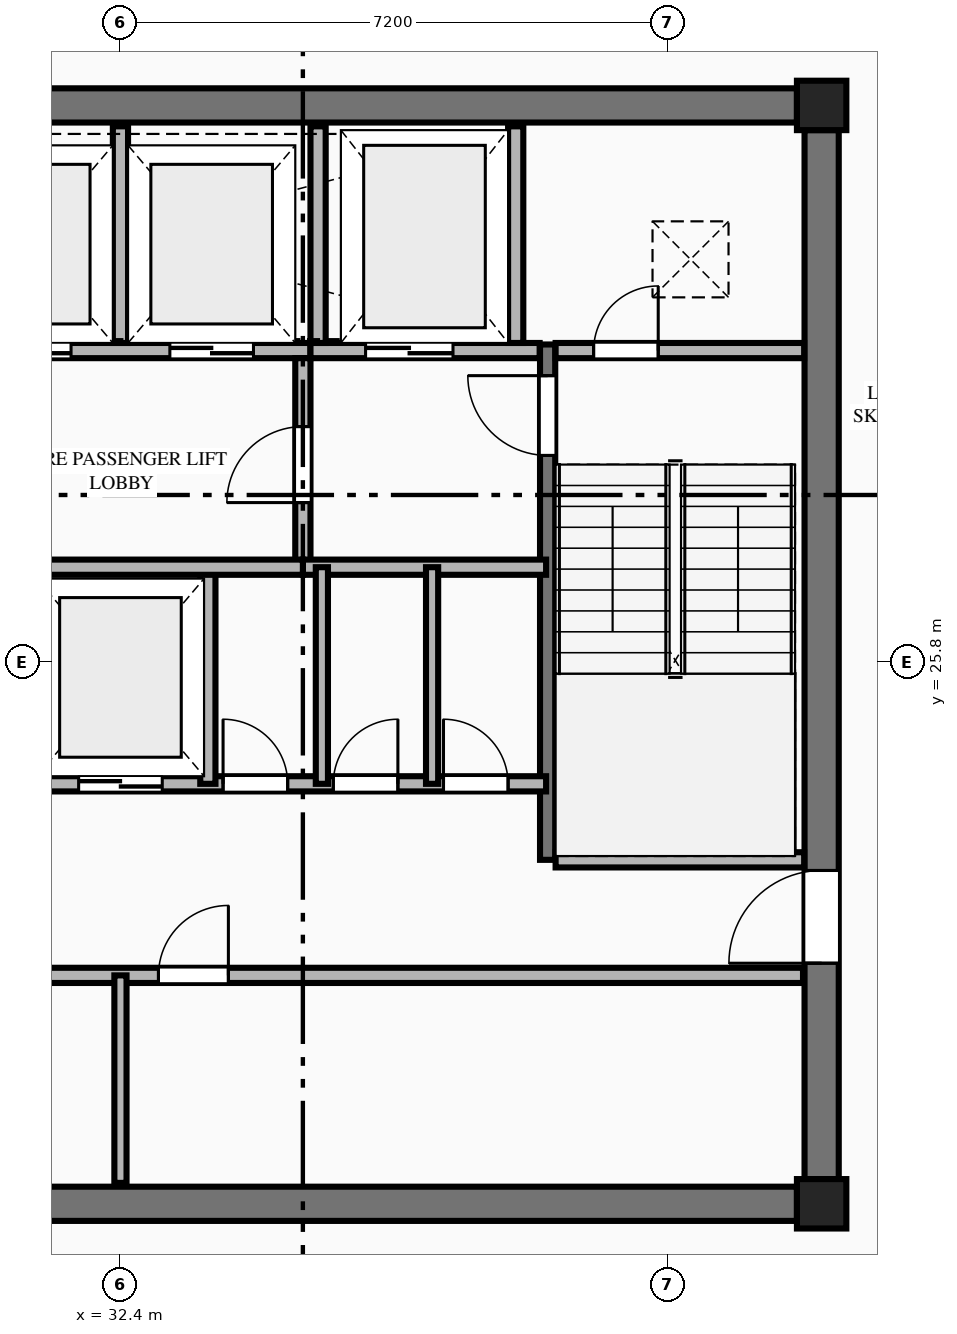
"""IFC4 building model, lengths in metres.
Left out: names, types, materials, properties, quantities, classifications, styles, units other than length and angle.
Written with IfcOpenShell. Run it as: python <this file> out.ifc"""

import sys

from ifc_helpers import new_model, si_unit, direction, frame, frame_2d, origin, origin_2d, place, context, subcontext, project, spatial, rectangle, extrude, element, fill, save


model = new_model("IFC4")
c1 = context("Model", 3, precision=1e-05, world=origin(), true_north=direction((0.0, 1.0)))
c2 = subcontext(c1, "Body", "Model", "MODEL_VIEW")
j1 = project(units=[si_unit("LENGTHUNIT", "METRE"), si_unit("PLANEANGLEUNIT", "RADIAN")], contexts=[c1])
p1 = place(None, origin())
s1 = spatial("IfcSite", under=j1, at=p1, CompositionType="ELEMENT")
p2 = place(p1, origin())
s2 = spatial("IfcBuilding", under=s1, at=p2, CompositionType="ELEMENT")
p3 = place(p2, frame((0.0, 0.0, 230.65)))
s3 = spatial("IfcBuildingStorey", under=s2, at=p3, CompositionType="ELEMENT", Elevation=230.65)
for number, where, z_axis, x_axis in (
    (1, (41.625, 18.675, 0.0), (0.0, 0.0, 1.0), (1.0, 0.0, 0.0)),
    (2, (41.625, 33.125, 0.0), (0.0, 0.0, 1.0), (1.0, 0.0, 0.0)),
):
    element("IfcColumn", number, at=place(p3, frame(where, z_axis=z_axis, x_axis=x_axis)), inside=s3, PredefinedType="COLUMN", context=c2, shape_type="SweptSolid", body=[
        extrude(rectangle(XDim=0.65, YDim=0.65, at=origin_2d()), origin(), (0.0, 0.0, 1.0), 3.65),
    ])
for number, where, z_axis, x_axis in (
    (3, (23.5, 18.675, 0.0), (0.0, 0.0, 1.0), (1.0, 0.0, 0.0)),
    (4, (23.5, 33.125, 0.0), (0.0, 0.0, 1.0), (1.0, 0.0, 0.0)),
):
    element("IfcWall", number, at=place(p3, frame(where, z_axis=z_axis, x_axis=x_axis)), inside=s3, PredefinedType="SHEAR", context=c2, shape_type="SweptSolid", body=[
        extrude(rectangle(XDim=17.8, YDim=0.45, at=frame_2d((8.9, 0.0))), origin(), (0.0, 0.0, 1.0), 3.45),
    ])
p4 = place(p3, frame((41.625, 19.0, 0.0), z_axis=(0.0, 0.0, 1.0), x_axis=(0.0, 1.0, 0.0)))
e5 = element("IfcWall", 5, at=p4, inside=s3, PredefinedType="SHEAR", context=c2, shape_type="SweptSolid", body=[
    extrude(rectangle(XDim=13.8, YDim=0.45, at=frame_2d((6.9, 0.0))), origin(), (0.0, 0.0, 1.0), 3.45),
])
p5 = place(p4, frame((2.84, 0.0, 0.0)))
e6 = element("IfcOpeningElement", 6, at=p5, cuts=e5, PredefinedType="OPENING", context=c2, shape_type="SweptSolid", body=[
    extrude(rectangle(XDim=1.22, YDim=2.25, at=frame_2d((0.61, 1.125))), frame((0.0, 0.235, 0.0), z_axis=(0.0, -1.0, 0.0), x_axis=(1.0, 0.0, 0.0)), (0.0, 0.0, 1.0), 0.47),
])
p6 = place(p3, frame((38.02, 23.2, 0.0), z_axis=(0.0, 0.0, 1.0), x_axis=(0.0, 1.0, 0.0)))
e7 = element("IfcWall", 7, at=p6, inside=s3, PredefinedType="SHEAR", context=c2, shape_type="SweptSolid", body=[
    extrude(rectangle(XDim=6.78, YDim=0.2, at=frame_2d((3.39, 0.0))), origin(), (0.0, 0.0, 1.0), 3.65),
])
p7 = place(p6, frame((5.32, 0.0, 0.0)))
e8 = element("IfcOpeningElement", 8, at=p7, cuts=e7, PredefinedType="OPENING", context=c2, shape_type="SweptSolid", body=[
    extrude(rectangle(XDim=1.05, YDim=2.15, at=frame_2d((0.525, 1.075))), frame((0.0, 0.11, 0.0), z_axis=(0.0, -1.0, 0.0), x_axis=(1.0, 0.0, 0.0)), (0.0, 0.0, 1.0), 0.22),
])
p8 = place(p3, frame((38.125, 23.2, 0.0), z_axis=(0.0, 0.0, 1.0), x_axis=(1.0, 0.0, 0.0)))
e9 = element("IfcWall", 9, at=p8, inside=s3, PredefinedType="PLUMBINGWALL", context=c2, shape_type="SweptSolid", body=[
    extrude(rectangle(XDim=3.27, YDim=0.2, at=frame_2d((1.635, 0.0))), origin(), (0.0, 0.0, 1.0), 3.45),
])
p9 = place(p3, frame((29.9, 29.9, 0.0), z_axis=(0.0, 0.0, 1.0), x_axis=(1.0, 0.0, 0.0)))
e10 = element("IfcWall", 10, at=p9, inside=s3, PredefinedType="PLUMBINGWALL", context=c2, shape_type="SweptSolid", body=[
    extrude(rectangle(XDim=5.0, YDim=0.2, at=frame_2d((2.5, 0.0))), origin(), (0.0, 0.0, 1.0), 3.45),
])
p10 = place(p9, frame((0.75, 0.0, 0.0)))
e11 = element("IfcOpeningElement", 11, at=p10, cuts=e10, PredefinedType="OPENING", context=c2, shape_type="SweptSolid", body=[
    extrude(rectangle(XDim=1.1, YDim=2.2, at=frame_2d((0.55, 1.1))), frame((0.0, 0.11, 0.0), z_axis=(0.0, -1.0, 0.0), x_axis=(1.0, 0.0, 0.0)), (0.0, 0.0, 1.0), 0.22),
])
p11 = place(p9, frame((3.15, 0.0, 0.0)))
e12 = element("IfcOpeningElement", 12, at=p11, cuts=e10, PredefinedType="OPENING", context=c2, shape_type="SweptSolid", body=[
    extrude(rectangle(XDim=1.1, YDim=2.2, at=frame_2d((0.55, 1.1))), frame((0.0, 0.11, 0.0), z_axis=(0.0, -1.0, 0.0), x_axis=(1.0, 0.0, 0.0)), (0.0, 0.0, 1.0), 0.22),
])
p12 = place(p3, frame((34.9, 29.9, 0.0), z_axis=(0.0, 0.0, 1.0), x_axis=(1.0, 0.0, 0.0)))
e13 = element("IfcWall", 13, at=p12, inside=s3, PredefinedType="PLUMBINGWALL", context=c2, shape_type="SweptSolid", body=[
    extrude(rectangle(XDim=3.015, YDim=0.2, at=frame_2d((1.508, 0.0))), origin(), (0.0, 0.0, 1.0), 3.45),
])
p13 = place(p12, frame((0.725, 0.0, 0.0)))
e14 = element("IfcOpeningElement", 14, at=p13, cuts=e13, PredefinedType="OPENING", context=c2, shape_type="SweptSolid", body=[
    extrude(rectangle(XDim=1.15, YDim=2.2, at=frame_2d((0.575, 1.1))), frame((0.0, 0.11, 0.0), z_axis=(0.0, -1.0, 0.0), x_axis=(1.0, 0.0, 0.0)), (0.0, 0.0, 1.0), 0.22),
])
p14 = place(p3, frame((38.125, 29.9, 0.0), z_axis=(0.0, 0.0, 1.0), x_axis=(1.0, 0.0, 0.0)))
e15 = element("IfcWall", 15, at=p14, inside=s3, PredefinedType="PLUMBINGWALL", context=c2, shape_type="SweptSolid", body=[
    extrude(rectangle(XDim=3.27, YDim=0.2, at=frame_2d((1.635, 0.0))), origin(), (0.0, 0.0, 1.0), 3.45),
])
p15 = place(p14, frame((0.5, 0.0, 0.0)))
e16 = element("IfcOpeningElement", 16, at=p15, cuts=e15, PredefinedType="OPENING", context=c2, shape_type="SweptSolid", body=[
    extrude(rectangle(XDim=0.85, YDim=2.05, at=frame_2d((0.425, 1.025))), frame((0.0, 0.11, 0.0), z_axis=(0.0, -1.0, 0.0), x_axis=(1.0, 0.0, 0.0)), (0.0, 0.0, 1.0), 0.22),
])
for number, where, z_axis, x_axis in (
    (17, (32.4, 30.0, 0.0), (0.0, 0.0, 1.0), (0.0, 1.0, 0.0)),
    (18, (35.0, 30.0, 0.0), (0.0, 0.0, 1.0), (0.0, 1.0, 0.0)),
    (19, (37.6, 30.0, 0.0), (0.0, 0.0, 1.0), (0.0, 1.0, 0.0)),
):
    element("IfcWall", number, at=place(p3, frame(where, z_axis=z_axis, x_axis=x_axis)), inside=s3, PredefinedType="PLUMBINGWALL", context=c2, shape_type="SweptSolid", body=[
        extrude(rectangle(XDim=2.85, YDim=0.2, at=frame_2d((1.425, 0.0))), origin(), (0.0, 0.0, 1.0), 3.45),
    ])
p16 = place(p3, frame((34.8, 27.05, 0.0), z_axis=(0.0, 0.0, 1.0), x_axis=(0.0, 1.0, 0.0)))
e20 = element("IfcWall", 20, at=p16, inside=s3, PredefinedType="PLUMBINGWALL", context=c2, shape_type="SweptSolid", body=[
    extrude(rectangle(XDim=2.75, YDim=0.2, at=frame_2d((1.375, 0.0))), origin(), (0.0, 0.0, 1.0), 3.45),
])
p17 = place(p16, frame((0.85, 0.0, 0.0)))
e21 = element("IfcOpeningElement", 21, at=p17, cuts=e20, PredefinedType="OPENING", context=c2, shape_type="SweptSolid", body=[
    extrude(rectangle(XDim=1.0, YDim=2.15, at=frame_2d((0.5, 1.075))), frame((0.0, 0.11, 0.0), z_axis=(0.0, -1.0, 0.0), x_axis=(1.0, 0.0, 0.0)), (0.0, 0.0, 1.0), 0.22),
])
p18 = place(p3, frame((34.8, 27.05, 0.0), z_axis=(0.0, 0.0, 1.0), x_axis=(1.0, 0.0, 0.0)))
e22 = element("IfcWall", 22, at=p18, inside=s3, PredefinedType="PLUMBINGWALL", context=c2, shape_type="SweptSolid", body=[
    extrude(rectangle(XDim=3.2, YDim=0.2, at=frame_2d((1.6, 0.0))), origin(), (0.0, 0.0, 1.0), 3.45),
])
p19 = place(p3, frame((31.2, 24.2, 0.0), z_axis=(0.0, 0.0, 1.0), x_axis=(1.0, 0.0, 0.0)))
e23 = element("IfcWall", 23, at=p19, inside=s3, PredefinedType="PLUMBINGWALL", context=c2, shape_type="SweptSolid", body=[
    extrude(rectangle(XDim=6.8, YDim=0.2, at=frame_2d((3.4, 0.0))), origin(), (0.0, 0.0, 1.0), 3.45),
])
p20 = place(p19, frame((0.65, 0.0, 0.0)))
e24 = element("IfcOpeningElement", 24, at=p20, cuts=e23, PredefinedType="OPENING", context=c2, shape_type="SweptSolid", body=[
    extrude(rectangle(XDim=1.1, YDim=2.2, at=frame_2d((0.55, 1.1))), frame((0.0, 0.11, 0.0), z_axis=(0.0, -1.0, 0.0), x_axis=(1.0, 0.0, 0.0)), (0.0, 0.0, 1.0), 0.22),
])
p21 = place(p19, frame((2.55, 0.0, 0.0)))
e25 = element("IfcOpeningElement", 25, at=p21, cuts=e23, PredefinedType="OPENING", context=c2, shape_type="SweptSolid", body=[
    extrude(rectangle(XDim=0.85, YDim=2.05, at=frame_2d((0.425, 1.025))), frame((0.0, 0.11, 0.0), z_axis=(0.0, -1.0, 0.0), x_axis=(1.0, 0.0, 0.0)), (0.0, 0.0, 1.0), 0.22),
])
p22 = place(p19, frame((4.0, 0.0, 0.0)))
e26 = element("IfcOpeningElement", 26, at=p22, cuts=e23, PredefinedType="OPENING", context=c2, shape_type="SweptSolid", body=[
    extrude(rectangle(XDim=0.85, YDim=2.05, at=frame_2d((0.425, 1.025))), frame((0.0, 0.11, 0.0), z_axis=(0.0, -1.0, 0.0), x_axis=(1.0, 0.0, 0.0)), (0.0, 0.0, 1.0), 0.22),
])
p23 = place(p19, frame((5.45, 0.0, 0.0)))
e27 = element("IfcOpeningElement", 27, at=p23, cuts=e23, PredefinedType="OPENING", context=c2, shape_type="SweptSolid", body=[
    extrude(rectangle(XDim=0.85, YDim=2.05, at=frame_2d((0.425, 1.025))), frame((0.0, 0.11, 0.0), z_axis=(0.0, -1.0, 0.0), x_axis=(1.0, 0.0, 0.0)), (0.0, 0.0, 1.0), 0.22),
])
p24 = place(p3, frame((33.55, 24.2, 0.0), z_axis=(0.0, 0.0, 1.0), x_axis=(0.0, 1.0, 0.0)))
e28 = element("IfcWall", 28, at=p24, inside=s3, PredefinedType="PLUMBINGWALL", context=c2, shape_type="SweptSolid", body=[
    extrude(rectangle(XDim=2.85, YDim=0.2, at=frame_2d((1.425, 0.0))), origin(), (0.0, 0.0, 1.0), 3.45),
])
p25 = place(p3, frame((31.25, 27.05, 0.0), z_axis=(0.0, 0.0, 1.0), x_axis=(1.0, 0.0, 0.0)))
e29 = element("IfcWall", 29, at=p25, inside=s3, PredefinedType="PLUMBINGWALL", context=c2, shape_type="SweptSolid", body=[
    extrude(rectangle(XDim=3.55, YDim=0.2, at=frame_2d((1.775, 0.0))), origin(), (0.0, 0.0, 1.0), 3.45),
])
for number, where, z_axis, x_axis in (
    (30, (35.05, 24.2, 0.0), (0.0, 0.0, 1.0), (0.0, 1.0, 0.0)),
    (31, (36.5, 24.2, 0.0), (0.0, 0.0, 1.0), (0.0, 1.0, 0.0)),
):
    element("IfcWall", number, at=place(p3, frame(where, z_axis=z_axis, x_axis=x_axis)), inside=s3, PredefinedType="PARTITIONING", context=c2, shape_type="SweptSolid", body=[
        extrude(rectangle(XDim=2.85, YDim=0.16, at=frame_2d((1.425, 0.0))), origin(), (0.0, 0.0, 1.0), 3.45),
    ])
p26 = place(p3, frame((23.42, 21.68, 0.0), z_axis=(0.0, 0.0, 1.0), x_axis=(1.0, 0.0, 0.0)))
e32 = element("IfcWall", 32, at=p26, inside=s3, PredefinedType="PLUMBINGWALL", context=c2, shape_type="SweptSolid", body=[
    extrude(rectangle(XDim=17.96, YDim=0.2, at=frame_2d((8.98, 0.0))), origin(), (0.0, 0.0, 1.0), 3.45),
])
p27 = place(p26, frame((0.46, 0.0, 0.0)))
e33 = element("IfcOpeningElement", 33, at=p27, cuts=e32, PredefinedType="OPENING", context=c2, shape_type="SweptSolid", body=[
    extrude(rectangle(XDim=0.92, YDim=2.15, at=frame_2d((0.46, 1.075))), frame((0.0, 0.11, 0.0), z_axis=(0.0, -1.0, 0.0), x_axis=(1.0, 0.0, 0.0)), (0.0, 0.0, 1.0), 0.22),
])
p28 = place(p26, frame((9.48, 0.0, 0.0)))
e34 = element("IfcOpeningElement", 34, at=p28, cuts=e32, PredefinedType="OPENING", context=c2, shape_type="SweptSolid", body=[
    extrude(rectangle(XDim=0.92, YDim=2.15, at=frame_2d((0.46, 1.075))), frame((0.0, 0.11, 0.0), z_axis=(0.0, -1.0, 0.0), x_axis=(1.0, 0.0, 0.0)), (0.0, 0.0, 1.0), 0.22),
])
p29 = place(p3, frame((32.4, 18.95, 0.0), z_axis=(0.0, 0.0, 1.0), x_axis=(0.0, 1.0, 0.0)))
e35 = element("IfcWall", 35, at=p29, inside=s3, PredefinedType="PARTITIONING", context=c2, shape_type="SweptSolid", body=[
    extrude(rectangle(XDim=2.73, YDim=0.16, at=frame_2d((1.365, 0.0))), origin(), (0.0, 0.0, 1.0), 3.45),
])
p30 = place(p5, origin())
e36 = element("IfcDoor", 36, at=p30, inside=s3, OperationType="SINGLE_SWING_LEFT", PredefinedType="DOOR", context=c2, shape_type="SweptSolid", body=[
    extrude(rectangle(XDim=1.22, YDim=2.25, at=frame_2d((0.61, 1.125))), frame((0.0, 0.025, 0.0), z_axis=(0.0, -1.0, 0.0), x_axis=(1.0, 0.0, 0.0)), (0.0, 0.0, 1.0), 0.05),
])
fill(e6, e36)
p31 = place(p7, origin())
e37 = element("IfcDoor", 37, at=p31, inside=s3, OperationType="SINGLE_SWING_RIGHT", PredefinedType="DOOR", context=c2, shape_type="SweptSolid", body=[
    extrude(rectangle(XDim=1.05, YDim=2.15, at=frame_2d((0.525, 1.075))), frame((0.0, 0.025, 0.0), z_axis=(0.0, -1.0, 0.0), x_axis=(1.0, 0.0, 0.0)), (0.0, 0.0, 1.0), 0.05),
])
fill(e8, e37)
p32 = place(p15, origin())
e38 = element("IfcDoor", 38, at=p32, inside=s3, OperationType="SINGLE_SWING_RIGHT", PredefinedType="DOOR", context=c2, shape_type="SweptSolid", body=[
    extrude(rectangle(XDim=0.85, YDim=2.05, at=frame_2d((0.425, 1.025))), frame((0.0, 0.025, 0.0), z_axis=(0.0, -1.0, 0.0), x_axis=(1.0, 0.0, 0.0)), (0.0, 0.0, 1.0), 0.05),
])
fill(e16, e38)
p33 = place(p13, origin())
e39 = element("IfcDoor", 39, at=p33, inside=s3, OperationType="DOUBLE_DOOR_SLIDING", PredefinedType="DOOR", context=c2, shape_type="SweptSolid", body=[
    extrude(rectangle(XDim=1.15, YDim=2.2, at=frame_2d((0.575, 1.1))), frame((0.0, 0.025, 0.0), z_axis=(0.0, -1.0, 0.0), x_axis=(1.0, 0.0, 0.0)), (0.0, 0.0, 1.0), 0.05),
])
fill(e14, e39)
p34 = place(p10, origin())
e40 = element("IfcDoor", 40, at=p34, inside=s3, OperationType="DOUBLE_DOOR_SLIDING", PredefinedType="DOOR", context=c2, shape_type="SweptSolid", body=[
    extrude(rectangle(XDim=1.1, YDim=2.2, at=frame_2d((0.55, 1.1))), frame((0.0, 0.025, 0.0), z_axis=(0.0, -1.0, 0.0), x_axis=(1.0, 0.0, 0.0)), (0.0, 0.0, 1.0), 0.05),
])
fill(e11, e40)
p35 = place(p11, origin())
e41 = element("IfcDoor", 41, at=p35, inside=s3, OperationType="DOUBLE_DOOR_SLIDING", PredefinedType="DOOR", context=c2, shape_type="SweptSolid", body=[
    extrude(rectangle(XDim=1.1, YDim=2.2, at=frame_2d((0.55, 1.1))), frame((0.0, 0.025, 0.0), z_axis=(0.0, -1.0, 0.0), x_axis=(1.0, 0.0, 0.0)), (0.0, 0.0, 1.0), 0.05),
])
fill(e12, e41)
p36 = place(p17, origin())
e42 = element("IfcDoor", 42, at=p36, inside=s3, OperationType="SINGLE_SWING_LEFT", PredefinedType="DOOR", context=c2, shape_type="SweptSolid", body=[
    extrude(rectangle(XDim=1.0, YDim=2.15, at=frame_2d((0.5, 1.075))), frame((0.0, 0.025, 0.0), z_axis=(0.0, -1.0, 0.0), x_axis=(1.0, 0.0, 0.0)), (0.0, 0.0, 1.0), 0.05),
])
fill(e21, e42)
p37 = place(p20, origin())
e43 = element("IfcDoor", 43, at=p37, inside=s3, OperationType="DOUBLE_DOOR_SLIDING", PredefinedType="DOOR", context=c2, shape_type="SweptSolid", body=[
    extrude(rectangle(XDim=1.1, YDim=2.2, at=frame_2d((0.55, 1.1))), frame((0.0, 0.025, 0.0), z_axis=(0.0, -1.0, 0.0), x_axis=(1.0, 0.0, 0.0)), (0.0, 0.0, 1.0), 0.05),
])
fill(e24, e43)
p38 = place(p21, origin())
e44 = element("IfcDoor", 44, at=p38, inside=s3, OperationType="SINGLE_SWING_LEFT", PredefinedType="DOOR", context=c2, shape_type="SweptSolid", body=[
    extrude(rectangle(XDim=0.85, YDim=2.05, at=frame_2d((0.425, 1.025))), frame((0.0, 0.025, 0.0), z_axis=(0.0, -1.0, 0.0), x_axis=(1.0, 0.0, 0.0)), (0.0, 0.0, 1.0), 0.05),
])
fill(e25, e44)
p39 = place(p22, origin())
e45 = element("IfcDoor", 45, at=p39, inside=s3, OperationType="SINGLE_SWING_RIGHT", PredefinedType="DOOR", context=c2, shape_type="SweptSolid", body=[
    extrude(rectangle(XDim=0.85, YDim=2.05, at=frame_2d((0.425, 1.025))), frame((0.0, 0.025, 0.0), z_axis=(0.0, -1.0, 0.0), x_axis=(1.0, 0.0, 0.0)), (0.0, 0.0, 1.0), 0.05),
])
fill(e26, e45)
p40 = place(p23, origin())
e46 = element("IfcDoor", 46, at=p40, inside=s3, OperationType="SINGLE_SWING_LEFT", PredefinedType="DOOR", context=c2, shape_type="SweptSolid", body=[
    extrude(rectangle(XDim=0.85, YDim=2.05, at=frame_2d((0.425, 1.025))), frame((0.0, 0.025, 0.0), z_axis=(0.0, -1.0, 0.0), x_axis=(1.0, 0.0, 0.0)), (0.0, 0.0, 1.0), 0.05),
])
fill(e27, e46)
p41 = place(p28, origin())
e47 = element("IfcDoor", 47, at=p41, inside=s3, OperationType="SINGLE_SWING_RIGHT", PredefinedType="DOOR", context=c2, shape_type="SweptSolid", body=[
    extrude(rectangle(XDim=0.92, YDim=2.15, at=frame_2d((0.46, 1.075))), frame((0.0, 0.025, 0.0), z_axis=(0.0, -1.0, 0.0), x_axis=(1.0, 0.0, 0.0)), (0.0, 0.0, 1.0), 0.05),
])
fill(e34, e47)
save(model, sys.argv[1])
